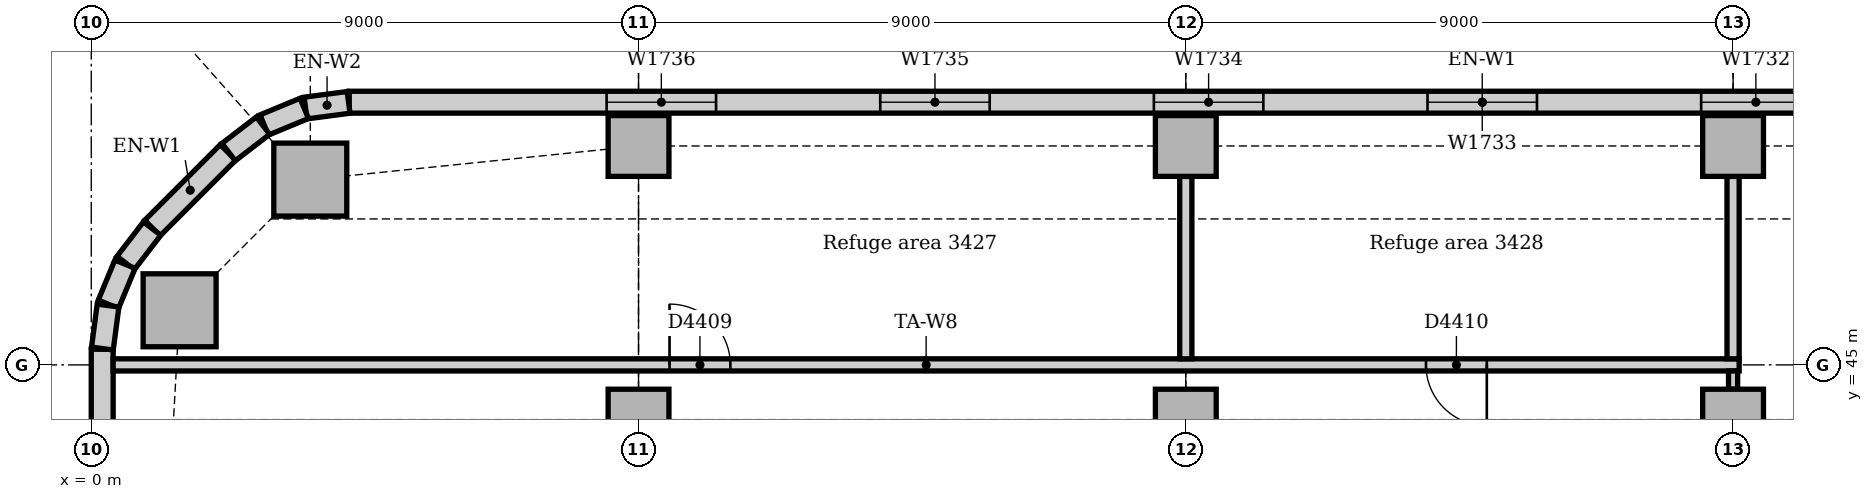
"""IFC4 building model, lengths in metres.
Left out: names, types, materials, properties, quantities, classifications, styles, units other than length and angle.
Written with IfcOpenShell. Run it as: python <this file> out.ifc"""

import sys

from ifc_helpers import new_model, si_unit, direction, frame, frame_2d, origin, origin_2d, place, context, subcontext, project, spatial, rectangle, extrude, element, fill, save


model = new_model("IFC4")
c1 = context("Model", 3, precision=1e-05, world=origin(), true_north=direction((0.0, 1.0)))
c2 = subcontext(c1, "Body", "Model", "MODEL_VIEW")
j1 = project(units=[si_unit("LENGTHUNIT", "METRE"), si_unit("PLANEANGLEUNIT", "RADIAN")], contexts=[c1])
p1 = place(None, origin())
s1 = spatial("IfcSite", under=j1, at=p1, CompositionType="ELEMENT")
p2 = place(p1, origin())
s2 = spatial("IfcBuilding", under=s1, at=p2, CompositionType="ELEMENT")
p3 = place(p2, frame((0.0, 0.0, 144.0)))
s3 = spatial("IfcBuildingStorey", under=s2, at=p3, CompositionType="ELEMENT", Elevation=144.0)
for number, where, z_axis, x_axis in (
    (1, (3.602, 48.047, 0.0), (0.0, 0.0, 1.0), (1.0, 0.0, 0.0)),
    (2, (1.453, 45.898, 0.0), (0.0, 0.0, 1.0), (1.0, 0.0, 0.0)),
):
    element("IfcColumn", number, at=place(p3, frame(where, z_axis=z_axis, x_axis=x_axis)), inside=s3, PredefinedType="COLUMN", context=c2, shape_type="SweptSolid", body=[
        extrude(rectangle(XDim=1.2, YDim=1.2, at=origin_2d()), origin(), (0.0, 0.0, 1.0), 4.85),
    ])
for number, where, z_axis, x_axis in (
    (3, (9.0, 48.6, 0.0), (0.0, 0.0, 1.0), (1.0, 0.0, 0.0)),
    (4, (18.0, 48.6, 0.0), (0.0, 0.0, 1.0), (1.0, 0.0, 0.0)),
    (5, (27.0, 48.6, 0.0), (0.0, 0.0, 1.0), (1.0, 0.0, 0.0)),
    (6, (9.0, 44.1, 0.0), (0.0, 0.0, 1.0), (1.0, 0.0, 0.0)),
    (7, (18.0, 44.1, 0.0), (0.0, 0.0, 1.0), (1.0, 0.0, 0.0)),
    (8, (27.0, 44.1, 0.0), (0.0, 0.0, 1.0), (1.0, 0.0, 0.0)),
):
    element("IfcColumn", number, at=place(p3, frame(where, z_axis=z_axis, x_axis=x_axis)), inside=s3, PredefinedType="COLUMN", context=c2, shape_type="SweptSolid", body=[
        extrude(rectangle(XDim=1.0, YDim=1.0, at=origin_2d()), origin(), (0.0, 0.0, 1.0), 4.85),
    ])
p4 = place(p3, frame((41.507, 49.32, 0.0), z_axis=(0.0, 0.0, 1.0), x_axis=(-1.0, 0.0, 0.0)))
e9 = element("IfcWall", 9, at=p4, inside=s3, PredefinedType="STANDARD", context=c2, shape_type="SweptSolid", body=[
    extrude(rectangle(XDim=37.265, YDim=0.36, at=frame_2d((18.632, 0.0))), origin(), (0.0, 0.0, 1.0), 3.25),
])
p5 = place(p4, frame((4.232, 0.0, 1.2)))
e10 = element("IfcOpeningElement", 10, at=p5, cuts=e9, PredefinedType="OPENING", context=c2, shape_type="SweptSolid", body=[
    extrude(rectangle(XDim=1.8, YDim=1.2, at=frame_2d((0.9, 0.6))), frame((0.0, 0.19, 0.0), z_axis=(0.0, -1.0, 0.0), x_axis=(1.0, 0.0, 0.0)), (0.0, 0.0, 1.0), 0.38),
])
p6 = place(p4, frame((8.732, 0.0, 1.2)))
e11 = element("IfcOpeningElement", 11, at=p6, cuts=e9, PredefinedType="OPENING", context=c2, shape_type="SweptSolid", body=[
    extrude(rectangle(XDim=1.8, YDim=1.2, at=frame_2d((0.9, 0.6))), frame((0.0, 0.19, 0.0), z_axis=(0.0, -1.0, 0.0), x_axis=(1.0, 0.0, 0.0)), (0.0, 0.0, 1.0), 0.38),
])
p7 = place(p4, frame((13.232, 0.0, 1.2)))
e12 = element("IfcOpeningElement", 12, at=p7, cuts=e9, PredefinedType="OPENING", context=c2, shape_type="SweptSolid", body=[
    extrude(rectangle(XDim=1.8, YDim=1.2, at=frame_2d((0.9, 0.6))), frame((0.0, 0.19, 0.0), z_axis=(0.0, -1.0, 0.0), x_axis=(1.0, 0.0, 0.0)), (0.0, 0.0, 1.0), 0.38),
])
p8 = place(p4, frame((17.732, 0.0, 1.2)))
e13 = element("IfcOpeningElement", 13, at=p8, cuts=e9, PredefinedType="OPENING", context=c2, shape_type="SweptSolid", body=[
    extrude(rectangle(XDim=1.8, YDim=1.2, at=frame_2d((0.9, 0.6))), frame((0.0, 0.19, 0.0), z_axis=(0.0, -1.0, 0.0), x_axis=(1.0, 0.0, 0.0)), (0.0, 0.0, 1.0), 0.38),
])
p9 = place(p4, frame((22.232, 0.0, 1.2)))
e14 = element("IfcOpeningElement", 14, at=p9, cuts=e9, PredefinedType="OPENING", context=c2, shape_type="SweptSolid", body=[
    extrude(rectangle(XDim=1.8, YDim=1.2, at=frame_2d((0.9, 0.6))), frame((0.0, 0.19, 0.0), z_axis=(0.0, -1.0, 0.0), x_axis=(1.0, 0.0, 0.0)), (0.0, 0.0, 1.0), 0.38),
])
p10 = place(p4, frame((26.732, 0.0, 1.2)))
e15 = element("IfcOpeningElement", 15, at=p10, cuts=e9, PredefinedType="OPENING", context=c2, shape_type="SweptSolid", body=[
    extrude(rectangle(XDim=1.8, YDim=1.2, at=frame_2d((0.9, 0.6))), frame((0.0, 0.19, 0.0), z_axis=(0.0, -1.0, 0.0), x_axis=(1.0, 0.0, 0.0)), (0.0, 0.0, 1.0), 0.38),
])
p11 = place(p4, frame((31.232, 0.0, 1.2)))
e16 = element("IfcOpeningElement", 16, at=p11, cuts=e9, PredefinedType="OPENING", context=c2, shape_type="SweptSolid", body=[
    extrude(rectangle(XDim=1.8, YDim=1.2, at=frame_2d((0.9, 0.6))), frame((0.0, 0.19, 0.0), z_axis=(0.0, -1.0, 0.0), x_axis=(1.0, 0.0, 0.0)), (0.0, 0.0, 1.0), 0.38),
])
p12 = place(p3, frame((2.249, 48.494, 0.0), z_axis=(0.0, 0.0, 1.0), x_axis=(-0.707106781187, -0.707106781187, 0.0)))
e17 = element("IfcWall", 17, at=p12, inside=s3, PredefinedType="STANDARD", context=c2, shape_type="SweptSolid", body=[
    extrude(rectangle(XDim=1.757, YDim=0.36, at=frame_2d((0.879, 0.0))), origin(), (0.0, 0.0, 1.0), 3.25),
])
p13 = place(p3, frame((0.18, 45.257, 0.0), z_axis=(0.0, 0.0, 1.0), x_axis=(0.0, -1.0, 0.0)))
e18 = element("IfcWall", 18, at=p13, inside=s3, PredefinedType="STANDARD", context=c2, shape_type="SweptSolid", body=[
    extrude(rectangle(XDim=3.257, YDim=0.36, at=frame_2d((1.629, 0.0))), origin(), (0.0, 0.0, 1.0), 4.85),
])
for number, where, z_axis, x_axis in (
    (19, (4.231, 49.317, 0.0), (0.0, 0.0, 1.0), (-0.991, -0.131, 0.0)),
    (20, (3.503, 49.218, 0.0), (0.0, 0.0, 1.0), (-0.924, -0.383, 0.0)),
):
    element("IfcWall", number, at=place(p3, frame(where, z_axis=z_axis, x_axis=x_axis)), inside=s3, PredefinedType="STANDARD", context=c2, shape_type="SweptSolid", body=[
        extrude(rectangle(XDim=0.713, YDim=0.36, at=frame_2d((0.356, 0.0))), origin(), (0.0, 0.0, 1.0), 3.25),
    ])
for number, where, z_axis, x_axis in (
    (21, (2.825, 48.934, 0.0), (0.0, 0.0, 1.0), (-0.793, -0.609, 0.0)),
    (22, (1.0, 47.241, 0.0), (0.0, 0.0, 1.0), (-0.609, -0.793, 0.0)),
):
    element("IfcWall", number, at=place(p3, frame(where, z_axis=z_axis, x_axis=x_axis)), inside=s3, PredefinedType="STANDARD", context=c2, shape_type="SweptSolid", body=[
        extrude(rectangle(XDim=0.713, YDim=0.36, at=frame_2d((0.357, 0.0))), origin(), (0.0, 0.0, 1.0), 3.25),
    ])
for number, where, z_axis, x_axis in (
    (23, (0.555, 46.656, 0.0), (0.0, 0.0, 1.0), (-0.383, -0.924, 0.0)),
    (24, (0.276, 45.976, 0.0), (0.0, 0.0, 1.0), (-0.131, -0.991, 0.0)),
):
    element("IfcWall", number, at=place(p3, frame(where, z_axis=z_axis, x_axis=x_axis)), inside=s3, PredefinedType="STANDARD", context=c2, shape_type="SweptSolid", body=[
        extrude(rectangle(XDim=0.713, YDim=0.36, at=frame_2d((0.356, 0.0))), origin(), (0.0, 0.0, 1.0), 3.25),
    ])
p14 = place(p3, frame((0.36, 45.0, 0.0), z_axis=(0.0, 0.0, 1.0), x_axis=(1.0, 0.0, 0.0)))
e25 = element("IfcWall", 25, at=p14, inside=s3, PredefinedType="PARTITIONING", context=c2, shape_type="SweptSolid", body=[
    extrude(rectangle(XDim=26.74, YDim=0.2, at=frame_2d((13.37, 0.0))), origin(), (0.0, 0.0, 1.0), 4.85),
])
p15 = place(p14, frame((9.15, 0.0, 0.0)))
e26 = element("IfcOpeningElement", 26, at=p15, cuts=e25, PredefinedType="OPENING", context=c2, shape_type="SweptSolid", body=[
    extrude(rectangle(XDim=1.0, YDim=2.1, at=frame_2d((0.5, 1.05))), frame((0.0, 0.11, 0.0), z_axis=(0.0, -1.0, 0.0), x_axis=(1.0, 0.0, 0.0)), (0.0, 0.0, 1.0), 0.22),
])
p16 = place(p14, frame((21.59, 0.0, 0.0)))
e27 = element("IfcOpeningElement", 27, at=p16, cuts=e25, PredefinedType="OPENING", context=c2, shape_type="SweptSolid", body=[
    extrude(rectangle(XDim=1.0, YDim=2.1, at=frame_2d((0.5, 1.05))), frame((0.0, 0.11, 0.0), z_axis=(0.0, -1.0, 0.0), x_axis=(1.0, 0.0, 0.0)), (0.0, 0.0, 1.0), 0.22),
])
for number, where, z_axis, x_axis in (
    (28, (18.0, 45.1, 0.0), (0.0, 0.0, 1.0), (0.0, 1.0, 0.0)),
    (29, (27.0, 45.1, 0.0), (0.0, 0.0, 1.0), (0.0, 1.0, 0.0)),
):
    element("IfcWall", number, at=place(p3, frame(where, z_axis=z_axis, x_axis=x_axis)), inside=s3, PredefinedType="PARTITIONING", context=c2, shape_type="SweptSolid", body=[
        extrude(rectangle(XDim=3.0, YDim=0.2, at=frame_2d((1.5, 0.0))), origin(), (0.0, 0.0, 1.0), 4.85),
    ])
p17 = place(p3, frame((27.0, 44.6, 0.0), z_axis=(0.0, 0.0, 1.0), x_axis=(0.0, 1.0, 0.0)))
e30 = element("IfcWall", 30, at=p17, inside=s3, PredefinedType="PARTITIONING", context=c2, shape_type="SweptSolid", body=[
    extrude(rectangle(XDim=0.3, YDim=0.15, at=frame_2d((0.15, 0.0))), origin(), (0.0, 0.0, 1.0), 4.85),
])
p18 = place(p7, origin())
e31 = element("IfcWindow", 31, at=p18, inside=s3, PartitioningType="SINGLE_PANEL", PredefinedType="WINDOW", context=c2, shape_type="SweptSolid", body=[
    extrude(rectangle(XDim=1.8, YDim=1.2, at=frame_2d((0.9, 0.6))), frame((0.0, 0.13, 0.0), z_axis=(0.0, -1.0, 0.0), x_axis=(1.0, 0.0, 0.0)), (0.0, 0.0, 1.0), 0.06),
])
fill(e12, e31)
p19 = place(p8, origin())
e32 = element("IfcWindow", 32, at=p19, inside=s3, PartitioningType="SINGLE_PANEL", PredefinedType="WINDOW", context=c2, shape_type="SweptSolid", body=[
    extrude(rectangle(XDim=1.8, YDim=1.2, at=frame_2d((0.9, 0.6))), frame((0.0, 0.13, 0.0), z_axis=(0.0, -1.0, 0.0), x_axis=(1.0, 0.0, 0.0)), (0.0, 0.0, 1.0), 0.06),
])
fill(e13, e32)
p20 = place(p9, origin())
e33 = element("IfcWindow", 33, at=p20, inside=s3, PartitioningType="SINGLE_PANEL", PredefinedType="WINDOW", context=c2, shape_type="SweptSolid", body=[
    extrude(rectangle(XDim=1.8, YDim=1.2, at=frame_2d((0.9, 0.6))), frame((0.0, 0.13, 0.0), z_axis=(0.0, -1.0, 0.0), x_axis=(1.0, 0.0, 0.0)), (0.0, 0.0, 1.0), 0.06),
])
fill(e14, e33)
p21 = place(p10, origin())
e34 = element("IfcWindow", 34, at=p21, inside=s3, PartitioningType="SINGLE_PANEL", PredefinedType="WINDOW", context=c2, shape_type="SweptSolid", body=[
    extrude(rectangle(XDim=1.8, YDim=1.2, at=frame_2d((0.9, 0.6))), frame((0.0, 0.13, 0.0), z_axis=(0.0, -1.0, 0.0), x_axis=(1.0, 0.0, 0.0)), (0.0, 0.0, 1.0), 0.06),
])
fill(e15, e34)
p22 = place(p11, origin())
e35 = element("IfcWindow", 35, at=p22, inside=s3, PartitioningType="SINGLE_PANEL", PredefinedType="WINDOW", context=c2, shape_type="SweptSolid", body=[
    extrude(rectangle(XDim=1.8, YDim=1.2, at=frame_2d((0.9, 0.6))), frame((0.0, 0.13, 0.0), z_axis=(0.0, -1.0, 0.0), x_axis=(1.0, 0.0, 0.0)), (0.0, 0.0, 1.0), 0.06),
])
fill(e16, e35)
p23 = place(p15, origin())
e36 = element("IfcDoor", 36, at=p23, inside=s3, OperationType="SINGLE_SWING_LEFT", PredefinedType="DOOR", context=c2, shape_type="SweptSolid", body=[
    extrude(rectangle(XDim=1.0, YDim=2.1, at=frame_2d((0.5, 1.05))), frame((0.0, 0.025, 0.0), z_axis=(0.0, -1.0, 0.0), x_axis=(1.0, 0.0, 0.0)), (0.0, 0.0, 1.0), 0.05),
])
fill(e26, e36)
p24 = place(p16, frame((1.0, 0.0, 0.0), z_axis=(0.0, 0.0, 1.0), x_axis=(-1.0, 0.0, 0.0)))
e37 = element("IfcDoor", 37, at=p24, inside=s3, OperationType="SINGLE_SWING_LEFT", PredefinedType="DOOR", context=c2, shape_type="SweptSolid", body=[
    extrude(rectangle(XDim=1.0, YDim=2.1, at=frame_2d((0.5, 1.05))), frame((0.0, 0.025, 0.0), z_axis=(0.0, -1.0, 0.0), x_axis=(1.0, 0.0, 0.0)), (0.0, 0.0, 1.0), 0.05),
])
fill(e27, e37)
save(model, sys.argv[1])
